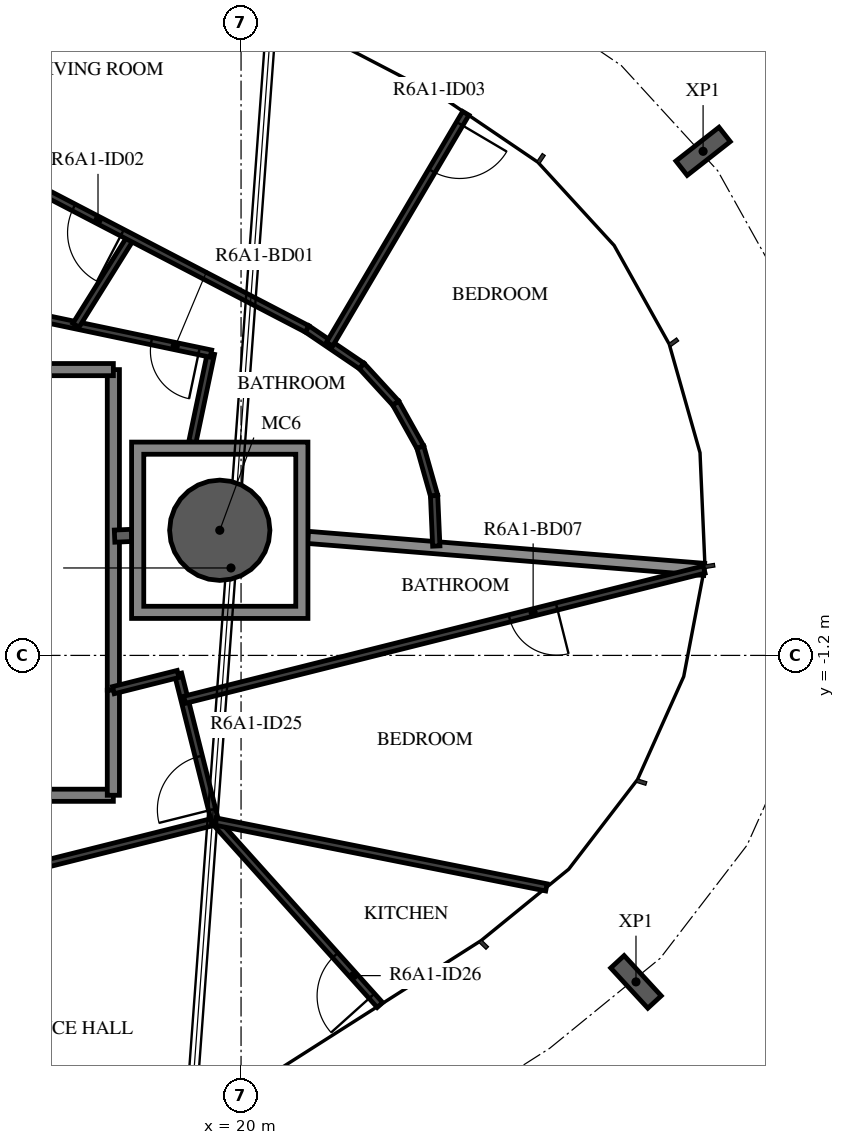
"""IFC4 building model, lengths in metres.
Left out: names, types, materials, properties, quantities, classifications, styles, units other than length and angle.
Written with IfcOpenShell. Run it as: python <this file> out.ifc"""

import sys

from ifc_helpers import new_model, si_unit, direction, frame, frame_2d, origin, origin_2d, place, context, subcontext, project, spatial, polyline, rectangle, hollow_circle, i_section, outline, extrude, element, fill, save


model = new_model("IFC4")
c1 = context("Model", 3, precision=1e-05, world=origin(), true_north=direction((0.0, 1.0)))
c2 = subcontext(c1, "Body", "Model", "MODEL_VIEW")
j1 = project(units=[si_unit("LENGTHUNIT", "METRE"), si_unit("PLANEANGLEUNIT", "RADIAN")], contexts=[c1])
p1 = place(None, origin())
s1 = spatial("IfcSite", under=j1, at=p1, CompositionType="ELEMENT")
p2 = place(p1, origin())
s2 = spatial("IfcBuilding", under=s1, at=p2, CompositionType="ELEMENT")
p3 = place(p2, frame((0.0, 0.0, 230.2)))
s3 = spatial("IfcBuildingStorey", under=s2, at=p3, CompositionType="ELEMENT", Elevation=230.2)
p4 = place(p3, frame((19.65, 0.858, -0.38), z_axis=(0.0, 0.0, 1.0), x_axis=(1.0, 0.0, 0.0)))
e1 = element("IfcColumn", 1, at=p4, inside=s3, PredefinedType="COLUMN", context=c2, shape_type="SweptSolid", body=[
    extrude(hollow_circle(Radius=0.825, WallThickness=0.04, at=origin_2d()), origin(), (0.0, 0.0, 1.0), 3.5),
])
for number, where, z_axis, x_axis in (
    (2, (26.495, -6.569, -0.38), (0.0, 0.0, 1.0), (-0.735, -0.678, 0.0)),
    (3, (27.598, 7.09, -0.38), (0.0, 0.0, 1.0), (0.617, -0.787, 0.0)),
):
    element("IfcColumn", number, at=place(p3, frame(where, z_axis=z_axis, x_axis=x_axis)), inside=s3, PredefinedType="COLUMN", context=c2, shape_type="SweptSolid", body=[
        extrude(i_section(OverallWidth=0.3, OverallDepth=0.9, WebThickness=0.019, FlangeThickness=0.035, FilletRadius=0.03, at=origin_2d()), origin(), (0.0, 0.0, 1.0), 3.5),
    ])
p5 = place(p3, frame((17.9, -1.772, 0.0), z_axis=(0.0, 0.0, 1.0), x_axis=(0.0, 1.0, 0.0)))
e4 = element("IfcWall", 4, at=p5, inside=s3, PredefinedType="STANDARD", context=c2, shape_type="SweptSolid", body=[
    extrude(rectangle(XDim=5.272, YDim=0.2, at=frame_2d((2.636, 0.0))), origin(), (0.0, 0.0, 1.0), 3.12),
])
p6 = place(p3, frame((17.9, 3.5, 0.0), z_axis=(0.0, 0.0, 1.0), x_axis=(-1.0, 0.0, 0.0)))
e5 = element("IfcWall", 5, at=p6, inside=s3, PredefinedType="STANDARD", context=c2, shape_type="SweptSolid", body=[
    extrude(rectangle(XDim=4.64, YDim=0.2, at=frame_2d((2.32, 0.0))), origin(), (0.0, 0.0, 1.0), 3.12),
])
p7 = place(p3, frame((13.285, -3.5, 0.0), z_axis=(0.0, 0.0, 1.0), x_axis=(1.0, 0.0, 0.0)))
e6 = element("IfcWall", 6, at=p7, inside=s3, PredefinedType="STANDARD", context=c2, shape_type="SweptSolid", body=[
    extrude(rectangle(XDim=4.615, YDim=0.2, at=frame_2d((2.308, 0.0))), origin(), (0.0, 0.0, 1.0), 3.12),
])
p8 = place(p3, frame((17.9, -3.5, 0.0), z_axis=(0.0, 0.0, 1.0), x_axis=(0.0, 1.0, 0.0)))
e7 = element("IfcWall", 7, at=p8, inside=s3, PredefinedType="STANDARD", context=c2, shape_type="SweptSolid", body=[
    extrude(rectangle(XDim=1.728, YDim=0.2, at=frame_2d((0.864, 0.0))), origin(), (0.0, 0.0, 1.0), 3.12),
])
p9 = place(p3, frame((17.92, 0.761, 0.0), z_axis=(0.0, 0.0, 1.0), x_axis=(0.999051221661, 0.04355061995, 0.0)))
e8 = element("IfcWall", 8, at=p9, inside=s3, PredefinedType="STANDARD", context=c2, shape_type="SweptSolid", body=[
    extrude(rectangle(XDim=0.28, YDim=0.2, at=frame_2d((0.14, 0.0))), origin(), (0.0, 0.0, 1.0), 3.12),
])
p10 = place(p3, frame((21.1, 0.741, 0.0), z_axis=(0.0, 0.0, 1.0), x_axis=(0.996750718609, -0.080548153006, 0.0)))
e9 = element("IfcWall", 9, at=p10, inside=s3, PredefinedType="STANDARD", context=c2, shape_type="SweptSolid", body=[
    extrude(rectangle(XDim=6.538, YDim=0.2, at=frame_2d((3.269, 0.0))), origin(), (0.0, 0.0, 1.0), 2.73),
])
p11 = place(p3, frame((19.199, 2.308, 0.0), z_axis=(0.0, 0.0, 1.0), x_axis=(0.205580140246, 0.978640284239, 0.0)))
e10 = element("IfcWall", 10, at=p11, inside=s3, PredefinedType="PARTITIONING", context=c2, shape_type="SweptSolid", body=[
    extrude(rectangle(XDim=1.487, YDim=0.12, at=frame_2d((0.743, 0.0))), origin(), (0.0, 0.0, 1.0), 3.12),
])
p12 = place(p3, frame((19.505, 3.763, 0.0), z_axis=(0.0, 0.0, 1.0), x_axis=(-0.978660081285, 0.205485876157, 0.0)))
e11 = element("IfcWall", 11, at=p12, inside=s3, PredefinedType="PARTITIONING", context=c2, shape_type="SweptSolid", body=[
    extrude(rectangle(XDim=4.996, YDim=0.12, at=frame_2d((2.498, 0.0))), origin(), (0.0, 0.0, 1.0), 3.12),
])
p13 = place(p12, frame((0.2, 0.0, 0.0)))
e12 = element("IfcOpeningElement", 12, at=p13, cuts=e11, PredefinedType="OPENING", context=c2, shape_type="SweptSolid", body=[
    extrude(rectangle(XDim=0.8, YDim=2.1, at=frame_2d((0.4, 1.05))), frame((0.0, 0.07, 0.0), z_axis=(0.0, -1.0, 0.0), x_axis=(1.0, 0.0, 0.0)), (0.0, 0.0, 1.0), 0.14),
])
p14 = place(p12, frame((2.869, 0.0, 0.0)))
e13 = element("IfcOpeningElement", 13, at=p14, cuts=e11, PredefinedType="OPENING", context=c2, shape_type="SweptSolid", body=[
    extrude(rectangle(XDim=0.9, YDim=2.1, at=frame_2d((0.45, 1.05))), frame((0.0, 0.07, 0.0), z_axis=(0.0, -1.0, 0.0), x_axis=(1.0, 0.0, 0.0)), (0.0, 0.0, 1.0), 0.14),
])
p15 = place(p3, frame((21.085, 4.169, 0.0), z_axis=(0.0, 0.0, 1.0), x_axis=(0.827390024541, -0.561627765776, 0.0)))
e14 = element("IfcWall", 14, at=p15, inside=s3, PredefinedType="PARTITIONING", context=c2, shape_type="SweptSolid", body=[
    extrude(rectangle(XDim=1.087, YDim=0.12, at=frame_2d((0.543, 0.0))), origin(), (0.0, 0.0, 1.0), 3.12),
])
p16 = place(p3, frame((21.984, 3.559, 0.0), z_axis=(0.0, 0.0, 1.0), x_axis=(0.675497816835, -0.737361986715, 0.0)))
e15 = element("IfcWall", 15, at=p16, inside=s3, PredefinedType="PARTITIONING", context=c2, shape_type="SweptSolid", body=[
    extrude(rectangle(XDim=0.829, YDim=0.12, at=frame_2d((0.415, 0.0))), origin(), (0.0, 0.0, 1.0), 3.12),
])
p17 = place(p3, frame((22.544, 2.948, 0.0), z_axis=(0.0, 0.0, 1.0), x_axis=(0.487392269075, -0.873183128585, 0.0)))
e16 = element("IfcWall", 16, at=p17, inside=s3, PredefinedType="PARTITIONING", context=c2, shape_type="SweptSolid", body=[
    extrude(rectangle(XDim=0.829, YDim=0.12, at=frame_2d((0.415, 0.0))), origin(), (0.0, 0.0, 1.0), 3.12),
])
for number, where, z_axis, x_axis in (
    (17, (22.948, 2.224, 0.0), (0.0, 0.0, 1.0), (0.273, -0.962, 0.0)),
    (18, (23.174, 1.427, 0.0), (0.0, 0.0, 1.0), (0.044, -0.999, 0.0)),
):
    element("IfcWall", number, at=place(p3, frame(where, z_axis=z_axis, x_axis=x_axis)), inside=s3, PredefinedType="PARTITIONING", context=c2, shape_type="SweptSolid", body=[
        extrude(rectangle(XDim=0.829, YDim=0.12, at=frame_2d((0.415, 0.0))), origin(), (0.0, 0.0, 1.0), 3.12),
    ])
p18 = place(p3, frame((23.696, 7.715, 0.0), z_axis=(0.0, 0.0, 1.0), x_axis=(-0.508219920645, -0.861227329025, 0.0)))
e19 = element("IfcWall", 19, at=p18, inside=s3, PredefinedType="PARTITIONING", context=c2, shape_type="SweptSolid", body=[
    extrude(rectangle(XDim=4.409, YDim=0.12, at=frame_2d((2.205, 0.0))), origin(), (0.0, 0.0, 1.0), 3.12),
])
p19 = place(p18, frame((0.2, 0.0, 0.0)))
e20 = element("IfcOpeningElement", 20, at=p19, cuts=e19, PredefinedType="OPENING", context=c2, shape_type="SweptSolid", body=[
    extrude(rectangle(XDim=0.9, YDim=2.1, at=frame_2d((0.45, 1.05))), frame((0.0, 0.07, 0.0), z_axis=(0.0, -1.0, 0.0), x_axis=(1.0, 0.0, 0.0)), (0.0, 0.0, 1.0), 0.14),
])
p20 = place(p3, frame((18.189, 5.677, 0.0), z_axis=(0.0, 0.0, 1.0), x_axis=(-0.529639004581, -0.848223157445, 0.0)))
e21 = element("IfcWall", 21, at=p20, inside=s3, PredefinedType="PARTITIONING", context=c2, shape_type="SweptSolid", body=[
    extrude(rectangle(XDim=1.707, YDim=0.12, at=frame_2d((0.854, 0.0))), origin(), (0.0, 0.0, 1.0), 3.12),
])
p21 = place(p3, frame((21.085, 4.169, 0.0), z_axis=(0.0, 0.0, 1.0), x_axis=(-0.887017373034, 0.461736050071, 0.0)))
e22 = element("IfcWall", 22, at=p21, inside=s3, PredefinedType="PARTITIONING", context=c2, shape_type="SweptSolid", body=[
    extrude(rectangle(XDim=10.247, YDim=0.12, at=frame_2d((5.123, 0.0))), origin(), (0.0, 0.0, 1.0), 3.12),
])
p22 = place(p21, frame((3.425, 0.0, 0.0)))
e23 = element("IfcOpeningElement", 23, at=p22, cuts=e22, PredefinedType="OPENING", context=c2, shape_type="SweptSolid", body=[
    extrude(rectangle(XDim=0.9, YDim=2.1, at=frame_2d((0.45, 1.05))), frame((0.0, 0.07, 0.0), z_axis=(0.0, -1.0, 0.0), x_axis=(1.0, 0.0, 0.0)), (0.0, 0.0, 1.0), 0.14),
])
p23 = place(p3, frame((14.029, -5.32, 0.0), z_axis=(0.0, 0.0, 1.0), x_axis=(0.969999099814, 0.243108507378, 0.0)))
e24 = element("IfcWall", 24, at=p23, inside=s3, PredefinedType="PARTITIONING", context=c2, shape_type="SweptSolid", body=[
    extrude(rectangle(XDim=5.715, YDim=0.12, at=frame_2d((2.857, 0.0))), origin(), (0.0, 0.0, 1.0), 3.12),
])
p24 = place(p3, frame((19.573, -3.93, 0.0), z_axis=(0.0, 0.0, 1.0), x_axis=(-0.243155959183, 0.96998720585, 0.0)))
e25 = element("IfcWall", 25, at=p24, inside=s3, PredefinedType="PARTITIONING", context=c2, shape_type="SweptSolid", body=[
    extrude(rectangle(XDim=2.5, YDim=0.12, at=frame_2d((1.25, 0.0))), origin(), (0.0, 0.0, 1.0), 3.12),
])
p25 = place(p24, frame((0.2, 0.0, 0.0)))
e26 = element("IfcOpeningElement", 26, at=p25, cuts=e25, PredefinedType="OPENING", context=c2, shape_type="SweptSolid", body=[
    extrude(rectangle(XDim=0.9, YDim=2.1, at=frame_2d((0.45, 1.05))), frame((0.0, 0.07, 0.0), z_axis=(0.0, -1.0, 0.0), x_axis=(1.0, 0.0, 0.0)), (0.0, 0.0, 1.0), 0.14),
])
p26 = place(p3, frame((18.965, -1.505, 0.0), z_axis=(0.0, 0.0, 1.0), x_axis=(-0.969998406835, -0.243111272339, 0.0)))
e27 = element("IfcWall", 27, at=p26, inside=s3, PredefinedType="PARTITIONING", context=c2, shape_type="SweptSolid", body=[
    extrude(rectangle(XDim=1.098, YDim=0.12, at=frame_2d((0.549, 0.0))), origin(), (0.0, 0.0, 1.0), 3.12),
])
p27 = place(p3, frame((22.284, -6.949, 0.0), z_axis=(0.0, 0.0, 1.0), x_axis=(-0.668156639948, 0.744020634454, 0.0)))
e28 = element("IfcWall", 28, at=p27, inside=s3, PredefinedType="PARTITIONING", context=c2, shape_type="SweptSolid", body=[
    extrude(rectangle(XDim=4.058, YDim=0.12, at=frame_2d((2.029, 0.0))), origin(), (0.0, 0.0, 1.0), 3.12),
])
p28 = place(p27, frame((0.2, 0.0, 0.0)))
e29 = element("IfcOpeningElement", 29, at=p28, cuts=e28, PredefinedType="OPENING", context=c2, shape_type="SweptSolid", body=[
    extrude(rectangle(XDim=0.9, YDim=2.1, at=frame_2d((0.45, 1.05))), frame((0.0, 0.07, 0.0), z_axis=(0.0, -1.0, 0.0), x_axis=(1.0, 0.0, 0.0)), (0.0, 0.0, 1.0), 0.14),
])
p29 = place(p3, frame((25.021, -5.015, 0.0), z_axis=(0.0, 0.0, 1.0), x_axis=(-0.98075605246, 0.195237203328, 0.0)))
e30 = element("IfcWall", 30, at=p29, inside=s3, PredefinedType="PARTITIONING", context=c2, shape_type="SweptSolid", body=[
    extrude(rectangle(XDim=5.556, YDim=0.12, at=frame_2d((2.778, 0.0))), origin(), (0.0, 0.0, 1.0), 3.12),
])
p30 = place(p3, frame((27.616, 0.212, 0.0), z_axis=(0.0, 0.0, 1.0), x_axis=(-0.969995609005, -0.243122435227, 0.0)))
e31 = element("IfcWall", 31, at=p30, inside=s3, PredefinedType="PARTITIONING", context=c2, shape_type="SweptSolid", body=[
    extrude(rectangle(XDim=8.81, YDim=0.12, at=frame_2d((4.405, 0.0))), origin(), (0.0, 0.0, 1.0), 3.12),
])
p31 = place(p30, frame((2.5, 0.0, 0.0)))
e32 = element("IfcOpeningElement", 32, at=p31, cuts=e31, PredefinedType="OPENING", context=c2, shape_type="SweptSolid", body=[
    extrude(rectangle(XDim=0.8, YDim=2.1, at=frame_2d((0.4, 1.05))), frame((0.0, 0.07, 0.0), z_axis=(0.0, -1.0, 0.0), x_axis=(1.0, 0.0, 0.0)), (0.0, 0.0, 1.0), 0.14),
])
p32 = place(p3, origin())
e33 = element("IfcWall", 33, at=p32, inside=s3, PredefinedType="STANDARD", context=c2, shape_type="SweptSolid", body=[
    extrude(outline(polyline([(21.1, 2.308), (21.1, -0.592), (18.2, -0.592), (18.2, 2.308), (21.1, 2.308)]), holes=[polyline([(18.4, -0.392), (20.9, -0.392), (20.9, 2.108), (18.4, 2.108), (18.4, -0.392)])]), origin(), (0.0, 0.0, 1.0), 3.12),
])
p33 = place(p13, origin())
e34 = element("IfcDoor", 34, at=p33, inside=s3, OperationType="SINGLE_SWING_LEFT", PredefinedType="DOOR", context=c2, shape_type="SweptSolid", body=[
    extrude(rectangle(XDim=0.8, YDim=2.1, at=frame_2d((0.4, 1.05))), frame((0.0, 0.025, 0.0), z_axis=(0.0, -1.0, 0.0), x_axis=(1.0, 0.0, 0.0)), (0.0, 0.0, 1.0), 0.05),
])
fill(e12, e34)
p34 = place(p22, origin())
e35 = element("IfcDoor", 35, at=p34, inside=s3, OperationType="SINGLE_SWING_LEFT", PredefinedType="DOOR", context=c2, shape_type="SweptSolid", body=[
    extrude(rectangle(XDim=0.9, YDim=2.1, at=frame_2d((0.45, 1.05))), frame((0.0, 0.025, 0.0), z_axis=(0.0, -1.0, 0.0), x_axis=(1.0, 0.0, 0.0)), (0.0, 0.0, 1.0), 0.05),
])
fill(e23, e35)
p35 = place(p19, origin())
e36 = element("IfcDoor", 36, at=p35, inside=s3, OperationType="SINGLE_SWING_LEFT", PredefinedType="DOOR", context=c2, shape_type="SweptSolid", body=[
    extrude(rectangle(XDim=0.9, YDim=2.1, at=frame_2d((0.45, 1.05))), frame((0.0, 0.025, 0.0), z_axis=(0.0, -1.0, 0.0), x_axis=(1.0, 0.0, 0.0)), (0.0, 0.0, 1.0), 0.05),
])
fill(e20, e36)
p36 = place(p25, origin())
e37 = element("IfcDoor", 37, at=p36, inside=s3, OperationType="SINGLE_SWING_RIGHT", PredefinedType="DOOR", context=c2, shape_type="SweptSolid", body=[
    extrude(rectangle(XDim=0.9, YDim=2.1, at=frame_2d((0.45, 1.05))), frame((0.0, 0.025, 0.0), z_axis=(0.0, -1.0, 0.0), x_axis=(1.0, 0.0, 0.0)), (0.0, 0.0, 1.0), 0.05),
])
fill(e26, e37)
p37 = place(p28, origin())
e38 = element("IfcDoor", 38, at=p37, inside=s3, OperationType="SINGLE_SWING_RIGHT", PredefinedType="DOOR", context=c2, shape_type="SweptSolid", body=[
    extrude(rectangle(XDim=0.9, YDim=2.1, at=frame_2d((0.45, 1.05))), frame((0.0, 0.025, 0.0), z_axis=(0.0, -1.0, 0.0), x_axis=(1.0, 0.0, 0.0)), (0.0, 0.0, 1.0), 0.05),
])
fill(e29, e38)
p38 = place(p31, origin())
e39 = element("IfcDoor", 39, at=p38, inside=s3, OperationType="SINGLE_SWING_RIGHT", PredefinedType="DOOR", context=c2, shape_type="SweptSolid", body=[
    extrude(rectangle(XDim=0.8, YDim=2.1, at=frame_2d((0.4, 1.05))), frame((0.0, 0.025, 0.0), z_axis=(0.0, -1.0, 0.0), x_axis=(1.0, 0.0, 0.0)), (0.0, 0.0, 1.0), 0.05),
])
fill(e32, e39)
save(model, sys.argv[1])
